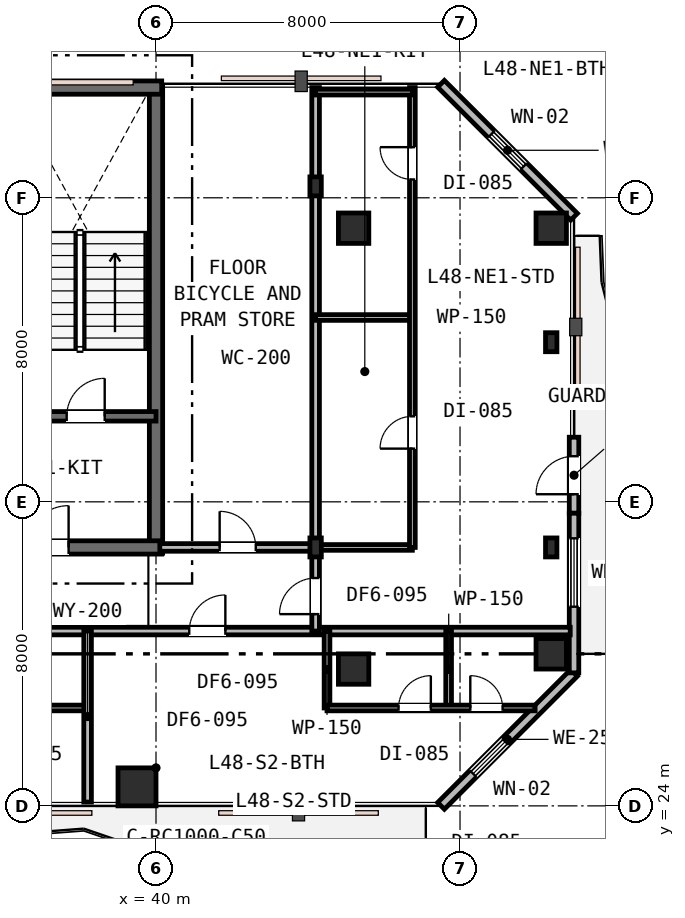
"""IFC4 building model, lengths in metres.
Left out: names, types, materials, properties, quantities, classifications, styles, units other than length and angle.
Written with IfcOpenShell. Run it as: python <this file> out.ifc"""

import sys

from ifc_helpers import new_model, si_unit, direction, frame, frame_2d, origin, origin_2d, place, context, subcontext, project, spatial, rectangle, i_section, extrude, element, fill, save


model = new_model("IFC4")
c1 = context("Model", 3, precision=1e-05, world=origin(), true_north=direction((0.0, 1.0)))
c2 = subcontext(c1, "Body", "Model", "MODEL_VIEW")
j1 = project(units=[si_unit("LENGTHUNIT", "METRE"), si_unit("PLANEANGLEUNIT", "RADIAN")], contexts=[c1])
p1 = place(None, origin())
s1 = spatial("IfcSite", under=j1, at=p1, CompositionType="ELEMENT")
p2 = place(p1, origin())
s2 = spatial("IfcBuilding", under=s1, at=p2, CompositionType="ELEMENT")
p3 = place(p2, frame((0.0, 0.0, 186.6)))
s3 = spatial("IfcBuildingStorey", under=s2, at=p3, CompositionType="ELEMENT", Elevation=186.6)
p4 = place(p3, frame((40.0, 30.65, 0.0), z_axis=(0.0, 0.0, 1.0), x_axis=(0.0, 1.0, 0.0)))
e1 = element("IfcWall", 1, at=p4, inside=s3, PredefinedType="SHEAR", context=c2, shape_type="SweptSolid", body=[
    extrude(rectangle(XDim=12.3, YDim=0.35, at=frame_2d((6.15, 0.0))), origin(), (0.0, 0.0, 1.0), 3.6),
])
p5 = place(p3, frame((15.85, 42.9, 0.0), z_axis=(0.0, 0.0, 1.0), x_axis=(1.0, 0.0, 0.0)))
e2 = element("IfcWall", 2, at=p5, inside=s3, PredefinedType="SHEAR", context=c2, shape_type="SweptSolid", body=[
    extrude(rectangle(XDim=24.3, YDim=0.35, at=frame_2d((12.15, 0.0))), origin(), (0.0, 0.0, 1.0), 3.6),
])
p6 = place(p3, frame((28.95, 30.8, 0.0), z_axis=(0.0, 0.0, 1.0), x_axis=(1.0, 0.0, 0.0)))
e3 = element("IfcWall", 3, at=p6, inside=s3, PredefinedType="SHEAR", context=c2, shape_type="SweptSolid", body=[
    extrude(rectangle(XDim=11.2, YDim=0.35, at=frame_2d((5.6, 0.0))), origin(), (0.0, 0.0, 1.0), 3.6),
])
p7 = place(p6, frame((7.65, 0.0, 0.0)))
e4 = element("IfcOpeningElement", 4, at=p7, cuts=e3, PredefinedType="OPENING", context=c2, shape_type="SweptSolid", body=[
    extrude(rectangle(XDim=1.1, YDim=2.15, at=frame_2d((0.55, 1.075))), frame((0.0, 0.185, 0.0), z_axis=(0.0, -1.0, 0.0), x_axis=(1.0, 0.0, 0.0)), (0.0, 0.0, 1.0), 0.37),
])
p8 = place(p3, frame((33.95, 34.25, 0.0), z_axis=(0.0, 0.0, 1.0), x_axis=(1.0, 0.0, 0.0)))
e5 = element("IfcWall", 5, at=p8, inside=s3, PredefinedType="SHEAR", context=c2, shape_type="SweptSolid", body=[
    extrude(rectangle(XDim=6.05, YDim=0.25, at=frame_2d((3.025, 0.0))), origin(), (0.0, 0.0, 1.0), 3.6),
])
p9 = place(p8, frame((3.7, 0.0, 0.0)))
e6 = element("IfcOpeningElement", 6, at=p9, cuts=e5, PredefinedType="OPENING", context=c2, shape_type="SweptSolid", body=[
    extrude(rectangle(XDim=1.0, YDim=2.15, at=frame_2d((0.5, 1.075))), frame((0.0, 0.135, 0.0), z_axis=(0.0, -1.0, 0.0), x_axis=(1.0, 0.0, 0.0)), (0.0, 0.0, 1.0), 0.27),
])
p10 = place(p8, frame((0.55, 0.0, 0.0)))
e7 = element("IfcOpeningElement", 7, at=p10, cuts=e5, PredefinedType="OPENING", context=c2, shape_type="SweptSolid", body=[
    extrude(rectangle(XDim=1.1, YDim=2.15, at=frame_2d((0.55, 1.075))), frame((0.0, 0.135, 0.0), z_axis=(0.0, -1.0, 0.0), x_axis=(1.0, 0.0, 0.0)), (0.0, 0.0, 1.0), 0.27),
])
p11 = place(p3, frame((39.5, 24.5, 0.0), z_axis=(0.0, 0.0, 1.0), x_axis=(1.0, 0.0, 0.0)))
e8 = element("IfcColumn", 8, at=p11, inside=s3, PredefinedType="COLUMN", context=c2, shape_type="SweptSolid", body=[
    extrude(rectangle(XDim=1.0, YDim=1.0, at=origin_2d()), origin(), (0.0, 0.0, 1.0), 3.6),
])
for number, where, z_axis, x_axis in (
    (9, (45.2, 27.6, 0.0), (0.0, 0.0, 1.0), (1.0, 0.0, 0.0)),
    (10, (45.2, 39.2, 0.0), (0.0, 0.0, 1.0), (1.0, 0.0, 0.0)),
    (11, (50.4, 28.0, 0.0), (0.0, 0.0, 1.0), (1.0, 0.0, 0.0)),
    (12, (50.4, 39.2, 0.0), (0.0, 0.0, 1.0), (1.0, 0.0, 0.0)),
):
    element("IfcColumn", number, at=place(p3, frame(where, z_axis=z_axis, x_axis=x_axis)), inside=s3, PredefinedType="COLUMN", context=c2, shape_type="SweptSolid", body=[
        extrude(rectangle(XDim=0.8, YDim=0.8, at=origin_2d()), origin(), (0.0, 0.0, 1.0), 3.6),
    ])
for number, where, z_axis, x_axis in (
    (13, (44.2, 30.8, 0.0), (0.0, 0.0, 1.0), (1.0, 0.0, 0.0)),
    (14, (44.2, 40.3, 0.0), (0.0, 0.0, 1.0), (1.0, 0.0, 0.0)),
    (15, (50.4, 30.8, 0.0), (0.0, 0.0, 1.0), (1.0, 0.0, 0.0)),
    (16, (50.4, 36.2, 0.0), (0.0, 0.0, 1.0), (1.0, 0.0, 0.0)),
):
    element("IfcColumn", number, at=place(p3, frame(where, z_axis=z_axis, x_axis=x_axis)), inside=s3, PredefinedType="COLUMN", context=c2, shape_type="SweptSolid", body=[
        extrude(i_section(OverallWidth=0.3, OverallDepth=0.5, WebThickness=0.015, FlangeThickness=0.028, FilletRadius=0.027, at=origin_2d()), origin(), (0.0, 0.0, 1.0), 3.6),
    ])
p12 = place(p3, frame((47.5, 24.0, 0.0), z_axis=(0.0, 0.0, 1.0), x_axis=(0.707106781187, 0.707106781187, 0.0)))
e17 = element("IfcWall", 17, at=p12, inside=s3, PredefinedType="STANDARD", context=c2, shape_type="SweptSolid", body=[
    extrude(rectangle(XDim=4.95, YDim=0.25, at=frame_2d((2.475, 0.0))), origin(), (0.0, 0.0, 1.0), 3.33),
])
p13 = place(p12, frame((1.196, 0.0, 0.85)))
e18 = element("IfcOpeningElement", 18, at=p13, cuts=e17, PredefinedType="OPENING", context=c2, shape_type="SweptSolid", body=[
    extrude(rectangle(XDim=1.2, YDim=1.6, at=frame_2d((0.6, 0.8))), frame((0.0, 0.135, 0.0), z_axis=(0.0, -1.0, 0.0), x_axis=(1.0, 0.0, 0.0)), (0.0, 0.0, 1.0), 0.27),
])
p14 = place(p3, frame((51.0, 31.7, 0.0), z_axis=(0.0, 0.0, 1.0), x_axis=(0.0, 1.0, 0.0)))
e19 = element("IfcWall", 19, at=p14, inside=s3, PredefinedType="STANDARD", context=c2, shape_type="SweptSolid", body=[
    extrude(rectangle(XDim=2.0, YDim=0.25, at=frame_2d((1.0, 0.0))), origin(), (0.0, 0.0, 1.0), 3.33),
])
p15 = place(p14, frame((0.5, 0.0, 0.0)))
e20 = element("IfcOpeningElement", 20, at=p15, cuts=e19, PredefinedType="OPENING", context=c2, shape_type="SweptSolid", body=[
    extrude(rectangle(XDim=1.0, YDim=2.15, at=frame_2d((0.5, 1.075))), frame((0.0, 0.135, 0.0), z_axis=(0.0, -1.0, 0.0), x_axis=(1.0, 0.0, 0.0)), (0.0, 0.0, 1.0), 0.27),
])
p16 = place(p3, frame((51.0, 27.5, 0.0), z_axis=(0.0, 0.0, 1.0), x_axis=(0.0, 1.0, 0.0)))
e21 = element("IfcWall", 21, at=p16, inside=s3, PredefinedType="STANDARD", context=c2, shape_type="SweptSolid", body=[
    extrude(rectangle(XDim=4.2, YDim=0.25, at=frame_2d((2.1, 0.0))), origin(), (0.0, 0.0, 1.0), 3.33),
])
p17 = place(p16, frame((1.74, 0.0, 0.75)))
e22 = element("IfcOpeningElement", 22, at=p17, cuts=e21, PredefinedType="OPENING", context=c2, shape_type="SweptSolid", body=[
    extrude(rectangle(XDim=1.8, YDim=1.85, at=frame_2d((0.9, 0.925))), frame((0.0, 0.135, 0.0), z_axis=(0.0, -1.0, 0.0), x_axis=(1.0, 0.0, 0.0)), (0.0, 0.0, 1.0), 0.27),
])
p18 = place(p3, frame((51.0, 39.5, 0.0), z_axis=(0.0, 0.0, 1.0), x_axis=(-0.707106781187, 0.707106781187, 0.0)))
e23 = element("IfcWall", 23, at=p18, inside=s3, PredefinedType="STANDARD", context=c2, shape_type="SweptSolid", body=[
    extrude(rectangle(XDim=4.95, YDim=0.25, at=frame_2d((2.475, 0.0))), origin(), (0.0, 0.0, 1.0), 3.33),
])
p19 = place(p18, frame((1.875, 0.0, 0.85)))
e24 = element("IfcOpeningElement", 24, at=p19, cuts=e23, PredefinedType="OPENING", context=c2, shape_type="SweptSolid", body=[
    extrude(rectangle(XDim=1.2, YDim=1.6, at=frame_2d((0.6, 0.8))), frame((0.0, 0.135, 0.0), z_axis=(0.0, -1.0, 0.0), x_axis=(1.0, 0.0, 0.0)), (0.0, 0.0, 1.0), 0.27),
])
p20 = place(p3, frame((11.6, 28.6, 0.0), z_axis=(0.0, 0.0, 1.0), x_axis=(1.0, 0.0, 0.0)))
e25 = element("IfcWall", 25, at=p20, inside=s3, PredefinedType="PARTITIONING", context=c2, shape_type="SweptSolid", body=[
    extrude(rectangle(XDim=39.3, YDim=0.2, at=frame_2d((19.65, 0.0))), origin(), (0.0, 0.0, 1.0), 2.92),
])
p21 = place(p20, frame((15.825, 0.0, 0.0)))
e26 = element("IfcOpeningElement", 26, at=p21, cuts=e25, PredefinedType="OPENING", context=c2, shape_type="SweptSolid", body=[
    extrude(rectangle(XDim=0.95, YDim=2.15, at=frame_2d((0.475, 1.075))), frame((0.0, 0.11, 0.0), z_axis=(0.0, -1.0, 0.0), x_axis=(1.0, 0.0, 0.0)), (0.0, 0.0, 1.0), 0.22),
])
p22 = place(p20, frame((29.275, 0.0, 0.0)))
e27 = element("IfcOpeningElement", 27, at=p22, cuts=e25, PredefinedType="OPENING", context=c2, shape_type="SweptSolid", body=[
    extrude(rectangle(XDim=0.95, YDim=2.15, at=frame_2d((0.475, 1.075))), frame((0.0, 0.11, 0.0), z_axis=(0.0, -1.0, 0.0), x_axis=(1.0, 0.0, 0.0)), (0.0, 0.0, 1.0), 0.22),
])
p23 = place(p3, frame((40.1, 30.8, 0.0), z_axis=(0.0, 0.0, 1.0), x_axis=(1.0, 0.0, 0.0)))
e28 = element("IfcWall", 28, at=p23, inside=s3, PredefinedType="PARTITIONING", context=c2, shape_type="SweptSolid", body=[
    extrude(rectangle(XDim=4.1, YDim=0.2, at=frame_2d((2.05, 0.0))), origin(), (0.0, 0.0, 1.0), 2.92),
])
p24 = place(p23, frame((1.575, 0.0, 0.0)))
e29 = element("IfcOpeningElement", 29, at=p24, cuts=e28, PredefinedType="OPENING", context=c2, shape_type="SweptSolid", body=[
    extrude(rectangle(XDim=0.95, YDim=2.15, at=frame_2d((0.475, 1.075))), frame((0.0, 0.11, 0.0), z_axis=(0.0, -1.0, 0.0), x_axis=(1.0, 0.0, 0.0)), (0.0, 0.0, 1.0), 0.22),
])
p25 = place(p3, frame((44.2, 28.6, 0.0), z_axis=(0.0, 0.0, 1.0), x_axis=(0.0, 1.0, 0.0)))
e30 = element("IfcWall", 30, at=p25, inside=s3, PredefinedType="PARTITIONING", context=c2, shape_type="SweptSolid", body=[
    extrude(rectangle(XDim=14.3, YDim=0.2, at=frame_2d((7.15, 0.0))), origin(), (0.0, 0.0, 1.0), 2.92),
])
p26 = place(p25, frame((0.445, 0.0, 0.0)))
e31 = element("IfcOpeningElement", 31, at=p26, cuts=e30, PredefinedType="OPENING", context=c2, shape_type="SweptSolid", body=[
    extrude(rectangle(XDim=0.95, YDim=2.15, at=frame_2d((0.475, 1.075))), frame((0.0, 0.11, 0.0), z_axis=(0.0, -1.0, 0.0), x_axis=(1.0, 0.0, 0.0)), (0.0, 0.0, 1.0), 0.22),
])
for number, where, z_axis, x_axis in (
    (32, (44.2, 30.8, 0.0), (0.0, 0.0, 1.0), (1.0, 0.0, 0.0)),
    (33, (44.2, 36.85, 0.0), (0.0, 0.0, 1.0), (1.0, 0.0, 0.0)),
):
    element("IfcWall", number, at=place(p3, frame(where, z_axis=z_axis, x_axis=x_axis)), inside=s3, PredefinedType="PARTITIONING", context=c2, shape_type="SweptSolid", body=[
        extrude(rectangle(XDim=2.546, YDim=0.15, at=frame_2d((1.273, 0.0))), origin(), (0.0, 0.0, 1.0), 2.92),
    ])
p27 = place(p3, frame((46.746, 30.8, 0.0), z_axis=(0.0, 0.0, 1.0), x_axis=(0.0, 1.0, 0.0)))
e34 = element("IfcWall", 34, at=p27, inside=s3, PredefinedType="PARTITIONING", context=c2, shape_type="SweptSolid", body=[
    extrude(rectangle(XDim=12.1, YDim=0.15, at=frame_2d((6.05, 0.0))), origin(), (0.0, 0.0, 1.0), 2.92),
])
p28 = place(p27, frame((2.6, 0.0, 0.0)))
e35 = element("IfcOpeningElement", 35, at=p28, cuts=e34, PredefinedType="OPENING", context=c2, shape_type="SweptSolid", body=[
    extrude(rectangle(XDim=0.85, YDim=2.15, at=frame_2d((0.425, 1.075))), frame((0.0, 0.085, 0.0), z_axis=(0.0, -1.0, 0.0), x_axis=(1.0, 0.0, 0.0)), (0.0, 0.0, 1.0), 0.17),
])
p29 = place(p27, frame((9.682, 0.0, 0.0)))
e36 = element("IfcOpeningElement", 36, at=p29, cuts=e34, PredefinedType="OPENING", context=c2, shape_type="SweptSolid", body=[
    extrude(rectangle(XDim=0.85, YDim=2.15, at=frame_2d((0.425, 1.075))), frame((0.0, 0.085, 0.0), z_axis=(0.0, -1.0, 0.0), x_axis=(1.0, 0.0, 0.0)), (0.0, 0.0, 1.0), 0.17),
])
p30 = place(p3, frame((44.2, 42.78, 0.0), z_axis=(0.0, 0.0, 1.0), x_axis=(1.0, 0.0, 0.0)))
e37 = element("IfcWall", 37, at=p30, inside=s3, PredefinedType="PARTITIONING", context=c2, shape_type="SweptSolid", body=[
    extrude(rectangle(XDim=2.546, YDim=0.15, at=frame_2d((1.273, 0.0))), origin(), (0.0, 0.0, 1.0), 3.33),
])
p31 = place(p3, frame((31.8, 26.576, 0.0), z_axis=(0.0, 0.0, 1.0), x_axis=(1.0, 0.0, 0.0)))
e38 = element("IfcWall", 38, at=p31, inside=s3, PredefinedType="PARTITIONING", context=c2, shape_type="SweptSolid", body=[
    extrude(rectangle(XDim=6.4, YDim=0.15, at=frame_2d((3.2, 0.0))), origin(), (0.0, 0.0, 1.0), 2.92),
])
p32 = place(p31, frame((1.472, 0.0, 0.0)))
e39 = element("IfcOpeningElement", 39, at=p32, cuts=e38, PredefinedType="OPENING", context=c2, shape_type="SweptSolid", body=[
    extrude(rectangle(XDim=0.85, YDim=2.15, at=frame_2d((0.425, 1.075))), frame((0.0, 0.085, 0.0), z_axis=(0.0, -1.0, 0.0), x_axis=(1.0, 0.0, 0.0)), (0.0, 0.0, 1.0), 0.17),
])
p33 = place(p31, frame((4.375, 0.0, 0.0)))
e40 = element("IfcOpeningElement", 40, at=p33, cuts=e38, PredefinedType="OPENING", context=c2, shape_type="SweptSolid", body=[
    extrude(rectangle(XDim=0.85, YDim=2.15, at=frame_2d((0.425, 1.075))), frame((0.0, 0.085, 0.0), z_axis=(0.0, -1.0, 0.0), x_axis=(1.0, 0.0, 0.0)), (0.0, 0.0, 1.0), 0.17),
])
p34 = place(p3, frame((38.2, 24.1, 0.0), z_axis=(0.0, 0.0, 1.0), x_axis=(0.0, 1.0, 0.0)))
e41 = element("IfcWall", 41, at=p34, inside=s3, PredefinedType="PARTITIONING", context=c2, shape_type="SweptSolid", body=[
    extrude(rectangle(XDim=4.5, YDim=0.2, at=frame_2d((2.25, 0.0))), origin(), (0.0, 0.0, 1.0), 3.02),
])
for number, where, z_axis, x_axis in (
    (42, (44.5, 26.576, 0.0), (0.0, 0.0, 1.0), (0.0, 1.0, 0.0)),
    (43, (47.7, 26.576, 0.0), (0.0, 0.0, 1.0), (0.0, 1.0, 0.0)),
):
    element("IfcWall", number, at=place(p3, frame(where, z_axis=z_axis, x_axis=x_axis)), inside=s3, PredefinedType="PARTITIONING", context=c2, shape_type="SweptSolid", body=[
        extrude(rectangle(XDim=2.024, YDim=0.15, at=frame_2d((1.012, 0.0))), origin(), (0.0, 0.0, 1.0), 3.33),
    ])
p35 = place(p3, frame((44.5, 26.576, 0.0), z_axis=(0.0, 0.0, 1.0), x_axis=(1.0, 0.0, 0.0)))
e44 = element("IfcWall", 44, at=p35, inside=s3, PredefinedType="PARTITIONING", context=c2, shape_type="SweptSolid", body=[
    extrude(rectangle(XDim=5.476, YDim=0.15, at=frame_2d((2.738, 0.0))), origin(), (0.0, 0.0, 1.0), 3.33),
])
p36 = place(p35, frame((1.882, 0.0, 0.0)))
e45 = element("IfcOpeningElement", 45, at=p36, cuts=e44, PredefinedType="OPENING", context=c2, shape_type="SweptSolid", body=[
    extrude(rectangle(XDim=0.85, YDim=2.15, at=frame_2d((0.425, 1.075))), frame((0.0, 0.085, 0.0), z_axis=(0.0, -1.0, 0.0), x_axis=(1.0, 0.0, 0.0)), (0.0, 0.0, 1.0), 0.17),
])
p37 = place(p35, frame((3.77, 0.0, 0.0)))
e46 = element("IfcOpeningElement", 46, at=p37, cuts=e44, PredefinedType="OPENING", context=c2, shape_type="SweptSolid", body=[
    extrude(rectangle(XDim=0.85, YDim=2.15, at=frame_2d((0.425, 1.075))), frame((0.0, 0.085, 0.0), z_axis=(0.0, -1.0, 0.0), x_axis=(1.0, 0.0, 0.0)), (0.0, 0.0, 1.0), 0.17),
])
p38 = place(p13, origin())
e47 = element("IfcWindow", 47, at=p38, inside=s3, PartitioningType="SINGLE_PANEL", PredefinedType="WINDOW", context=c2, shape_type="SweptSolid", body=[
    extrude(rectangle(XDim=1.2, YDim=1.6, at=frame_2d((0.6, 0.8))), frame((0.0, 0.03, 0.0), z_axis=(0.0, -1.0, 0.0), x_axis=(1.0, 0.0, 0.0)), (0.0, 0.0, 1.0), 0.06),
])
fill(e18, e47)
p39 = place(p15, origin())
e48 = element("IfcDoor", 48, at=p39, inside=s3, OperationType="SINGLE_SWING_LEFT", PredefinedType="DOOR", context=c2, shape_type="SweptSolid", body=[
    extrude(rectangle(XDim=1.0, YDim=2.15, at=frame_2d((0.5, 1.075))), frame((0.0, 0.025, 0.0), z_axis=(0.0, -1.0, 0.0), x_axis=(1.0, 0.0, 0.0)), (0.0, 0.0, 1.0), 0.05),
])
fill(e20, e48)
p40 = place(p17, origin())
e49 = element("IfcWindow", 49, at=p40, inside=s3, PartitioningType="SINGLE_PANEL", PredefinedType="WINDOW", context=c2, shape_type="SweptSolid", body=[
    extrude(rectangle(XDim=1.8, YDim=1.85, at=frame_2d((0.9, 0.925))), frame((0.0, 0.03, 0.0), z_axis=(0.0, -1.0, 0.0), x_axis=(1.0, 0.0, 0.0)), (0.0, 0.0, 1.0), 0.06),
])
fill(e22, e49)
p41 = place(p19, origin())
e50 = element("IfcWindow", 50, at=p41, inside=s3, PartitioningType="SINGLE_PANEL", PredefinedType="WINDOW", context=c2, shape_type="SweptSolid", body=[
    extrude(rectangle(XDim=1.2, YDim=1.6, at=frame_2d((0.6, 0.8))), frame((0.0, 0.03, 0.0), z_axis=(0.0, -1.0, 0.0), x_axis=(1.0, 0.0, 0.0)), (0.0, 0.0, 1.0), 0.06),
])
fill(e24, e50)
p42 = place(p9, origin())
e51 = element("IfcDoor", 51, at=p42, inside=s3, OperationType="SINGLE_SWING_RIGHT", PredefinedType="DOOR", context=c2, shape_type="SweptSolid", body=[
    extrude(rectangle(XDim=1.0, YDim=2.15, at=frame_2d((0.5, 1.075))), frame((0.0, 0.025, 0.0), z_axis=(0.0, -1.0, 0.0), x_axis=(1.0, 0.0, 0.0)), (0.0, 0.0, 1.0), 0.05),
])
fill(e6, e51)
p43 = place(p7, origin())
e52 = element("IfcDoor", 52, at=p43, inside=s3, OperationType="SINGLE_SWING_RIGHT", PredefinedType="DOOR", context=c2, shape_type="SweptSolid", body=[
    extrude(rectangle(XDim=1.1, YDim=2.15, at=frame_2d((0.55, 1.075))), frame((0.0, 0.025, 0.0), z_axis=(0.0, -1.0, 0.0), x_axis=(1.0, 0.0, 0.0)), (0.0, 0.0, 1.0), 0.05),
])
fill(e4, e52)
p44 = place(p24, origin())
e53 = element("IfcDoor", 53, at=p44, inside=s3, OperationType="SINGLE_SWING_LEFT", PredefinedType="DOOR", context=c2, shape_type="SweptSolid", body=[
    extrude(rectangle(XDim=0.95, YDim=2.15, at=frame_2d((0.475, 1.075))), frame((0.0, 0.025, 0.0), z_axis=(0.0, -1.0, 0.0), x_axis=(1.0, 0.0, 0.0)), (0.0, 0.0, 1.0), 0.05),
])
fill(e29, e53)
p45 = place(p26, origin())
e54 = element("IfcDoor", 54, at=p45, inside=s3, OperationType="SINGLE_SWING_LEFT", PredefinedType="DOOR", context=c2, shape_type="SweptSolid", body=[
    extrude(rectangle(XDim=0.95, YDim=2.15, at=frame_2d((0.475, 1.075))), frame((0.0, 0.025, 0.0), z_axis=(0.0, -1.0, 0.0), x_axis=(1.0, 0.0, 0.0)), (0.0, 0.0, 1.0), 0.05),
])
fill(e31, e54)
p46 = place(p28, origin())
e55 = element("IfcDoor", 55, at=p46, inside=s3, OperationType="SINGLE_SWING_LEFT", PredefinedType="DOOR", context=c2, shape_type="SweptSolid", body=[
    extrude(rectangle(XDim=0.85, YDim=2.15, at=frame_2d((0.425, 1.075))), frame((0.0, 0.025, 0.0), z_axis=(0.0, -1.0, 0.0), x_axis=(1.0, 0.0, 0.0)), (0.0, 0.0, 1.0), 0.05),
])
fill(e35, e55)
p47 = place(p29, origin())
e56 = element("IfcDoor", 56, at=p47, inside=s3, OperationType="SINGLE_SWING_RIGHT", PredefinedType="DOOR", context=c2, shape_type="SweptSolid", body=[
    extrude(rectangle(XDim=0.85, YDim=2.15, at=frame_2d((0.425, 1.075))), frame((0.0, 0.025, 0.0), z_axis=(0.0, -1.0, 0.0), x_axis=(1.0, 0.0, 0.0)), (0.0, 0.0, 1.0), 0.05),
])
fill(e36, e56)
p48 = place(p22, origin())
e57 = element("IfcDoor", 57, at=p48, inside=s3, OperationType="SINGLE_SWING_RIGHT", PredefinedType="DOOR", context=c2, shape_type="SweptSolid", body=[
    extrude(rectangle(XDim=0.95, YDim=2.15, at=frame_2d((0.475, 1.075))), frame((0.0, 0.025, 0.0), z_axis=(0.0, -1.0, 0.0), x_axis=(1.0, 0.0, 0.0)), (0.0, 0.0, 1.0), 0.05),
])
fill(e27, e57)
p49 = place(p36, origin())
e58 = element("IfcDoor", 58, at=p49, inside=s3, OperationType="SINGLE_SWING_RIGHT", PredefinedType="DOOR", context=c2, shape_type="SweptSolid", body=[
    extrude(rectangle(XDim=0.85, YDim=2.15, at=frame_2d((0.425, 1.075))), frame((0.0, 0.025, 0.0), z_axis=(0.0, -1.0, 0.0), x_axis=(1.0, 0.0, 0.0)), (0.0, 0.0, 1.0), 0.05),
])
fill(e45, e58)
p50 = place(p37, origin())
e59 = element("IfcDoor", 59, at=p50, inside=s3, OperationType="SINGLE_SWING_LEFT", PredefinedType="DOOR", context=c2, shape_type="SweptSolid", body=[
    extrude(rectangle(XDim=0.85, YDim=2.15, at=frame_2d((0.425, 1.075))), frame((0.0, 0.025, 0.0), z_axis=(0.0, -1.0, 0.0), x_axis=(1.0, 0.0, 0.0)), (0.0, 0.0, 1.0), 0.05),
])
fill(e46, e59)
save(model, sys.argv[1])
